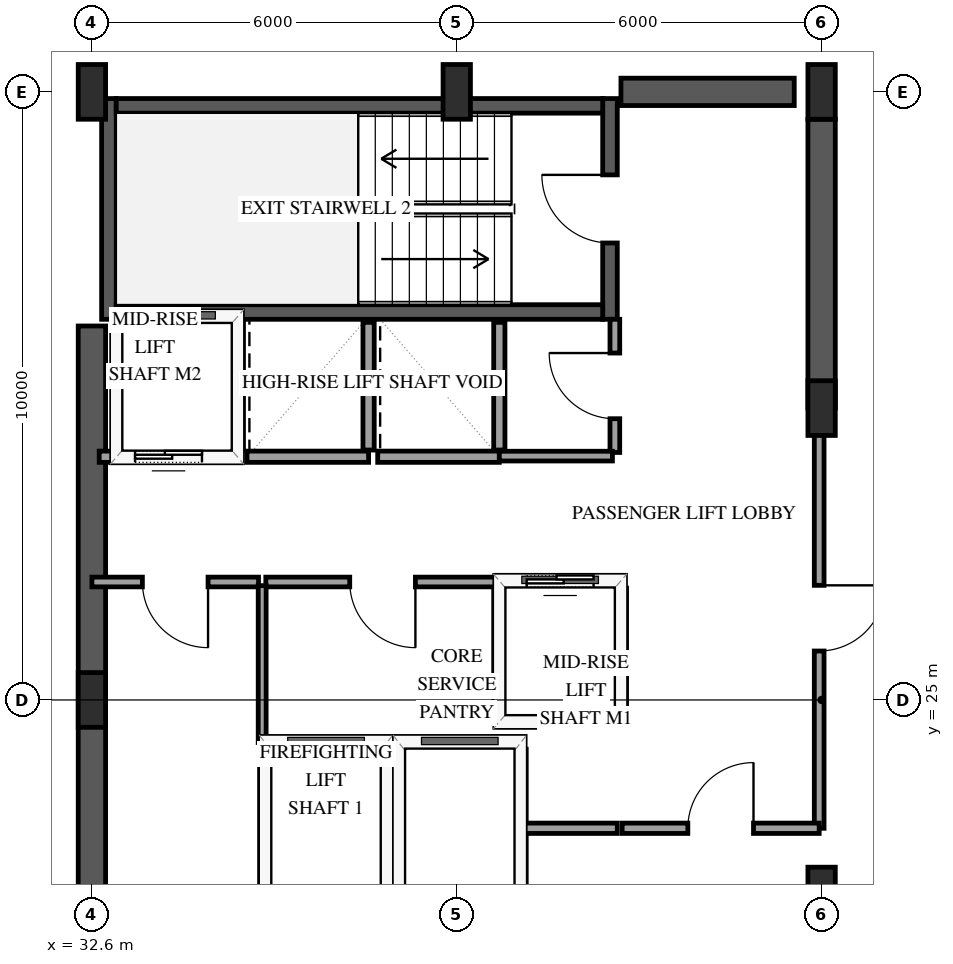
"""IFC4 building model, lengths in metres.
Left out: names, types, materials, properties, quantities, classifications, styles, units other than length and angle.
Written with IfcOpenShell. Run it as: python <this file> out.ifc"""

import sys

from ifc_helpers import new_model, si_unit, direction, frame, frame_2d, origin, origin_2d, place, context, subcontext, project, spatial, rectangle, extrude, element, fill, save


model = new_model("IFC4")
c1 = context("Model", 3, precision=1e-05, world=origin(), true_north=direction((0.0, 1.0)))
c2 = subcontext(c1, "Body", "Model", "MODEL_VIEW")
j1 = project(units=[si_unit("LENGTHUNIT", "METRE"), si_unit("PLANEANGLEUNIT", "RADIAN")], contexts=[c1])
p1 = place(None, origin())
s1 = spatial("IfcSite", under=j1, at=p1, CompositionType="ELEMENT")
p2 = place(p1, origin())
s2 = spatial("IfcBuilding", under=s1, at=p2, CompositionType="ELEMENT")
p3 = place(p2, frame((0.0, 0.0, 201.4)))
s3 = spatial("IfcBuildingStorey", under=s2, at=p3, CompositionType="ELEMENT", Elevation=201.4)
p4 = place(p3, frame((32.88, 31.26, 0.0), z_axis=(0.0, 0.0, 1.0), x_axis=(0.0, 1.0, 0.0)))
e1 = element("IfcWall", 1, at=p4, inside=s3, PredefinedType="SHEAR", context=c2, shape_type="SweptSolid", body=[
    extrude(rectangle(XDim=3.63, YDim=0.24, at=frame_2d((1.815, 0.0))), origin(), (0.0, 0.0, 1.0), 3.6),
])
p5 = place(p3, frame((41.12, 31.26, 0.0), z_axis=(0.0, 0.0, 1.0), x_axis=(0.0, 1.0, 0.0)))
e2 = element("IfcWall", 2, at=p5, inside=s3, PredefinedType="SHEAR", context=c2, shape_type="SweptSolid", body=[
    extrude(rectangle(XDim=3.63, YDim=0.24, at=frame_2d((1.815, 0.0))), origin(), (0.0, 0.0, 1.0), 3.6),
])
p6 = place(p5, frame((1.255, 0.0, 0.0)))
e3 = element("IfcOpeningElement", 3, at=p6, cuts=e2, PredefinedType="OPENING", context=c2, shape_type="SweptSolid", body=[
    extrude(rectangle(XDim=1.12, YDim=2.15, at=frame_2d((0.56, 1.075))), frame((0.0, 0.13, 0.0), z_axis=(0.0, -1.0, 0.0), x_axis=(1.0, 0.0, 0.0)), (0.0, 0.0, 1.0), 0.26),
])
for number, where, z_axis, x_axis in (
    (4, (33.0, 31.38, 0.0), (0.0, 0.0, 1.0), (1.0, 0.0, 0.0)),
    (5, (33.0, 34.77, 0.0), (0.0, 0.0, 1.0), (1.0, 0.0, 0.0)),
):
    element("IfcWall", number, at=place(p3, frame(where, z_axis=z_axis, x_axis=x_axis)), inside=s3, PredefinedType="SHEAR", context=c2, shape_type="SweptSolid", body=[
        extrude(rectangle(XDim=8.0, YDim=0.24, at=frame_2d((4.0, 0.0))), origin(), (0.0, 0.0, 1.0), 3.6),
    ])
p7 = place(p3, frame((32.6, 18.85, 0.0), z_axis=(0.0, 0.0, 1.0), x_axis=(0.0, 1.0, 0.0)))
e6 = element("IfcWall", 6, at=p7, inside=s3, PredefinedType="SHEAR", context=c2, shape_type="SweptSolid", body=[
    extrude(rectangle(XDim=12.3, YDim=0.45, at=frame_2d((6.15, 0.0))), origin(), (0.0, 0.0, 1.0), 3.6),
])
p8 = place(p3, frame((41.3, 35.0, 0.0), z_axis=(0.0, 0.0, 1.0), x_axis=(1.0, 0.0, 0.0)))
e7 = element("IfcWall", 7, at=p8, inside=s3, PredefinedType="SHEAR", context=c2, shape_type="SweptSolid", body=[
    extrude(rectangle(XDim=2.85, YDim=0.45, at=frame_2d((1.425, 0.0))), origin(), (0.0, 0.0, 1.0), 3.6),
])
p9 = place(p3, frame((44.6, 29.8, 0.0), z_axis=(0.0, 0.0, 1.0), x_axis=(0.0, 1.0, 0.0)))
e8 = element("IfcWall", 8, at=p9, inside=s3, PredefinedType="SHEAR", context=c2, shape_type="SweptSolid", body=[
    extrude(rectangle(XDim=4.75, YDim=0.45, at=frame_2d((2.375, 0.0))), origin(), (0.0, 0.0, 1.0), 3.6),
])
for number, where, z_axis, x_axis in (
    (9, (32.6, 25.0, 0.0), (0.0, 0.0, 1.0), (1.0, 0.0, 0.0)),
    (10, (32.6, 35.0, 0.0), (0.0, 0.0, 1.0), (1.0, 0.0, 0.0)),
    (11, (38.6, 35.0, 0.0), (0.0, 0.0, 1.0), (1.0, 0.0, 0.0)),
    (12, (44.6, 21.8, 0.0), (0.0, 0.0, 1.0), (1.0, 0.0, 0.0)),
    (13, (44.6, 29.8, 0.0), (0.0, 0.0, 1.0), (1.0, 0.0, 0.0)),
    (14, (44.6, 35.0, 0.0), (0.0, 0.0, 1.0), (1.0, 0.0, 0.0)),
):
    element("IfcColumn", number, at=place(p3, frame(where, z_axis=z_axis, x_axis=x_axis)), inside=s3, PredefinedType="PILASTER", context=c2, shape_type="SweptSolid", body=[
        extrude(rectangle(XDim=0.45, YDim=0.9, at=origin_2d()), origin(), (0.0, 0.0, 1.0), 3.6),
    ])
p10 = place(p3, frame((35.45, 24.3, 0.0), z_axis=(0.0, 0.0, 1.0), x_axis=(1.0, 0.0, 0.0)))
e15 = element("IfcWall", 15, at=p10, inside=s3, PredefinedType="SOLIDWALL", context=c2, shape_type="SweptSolid", body=[
    extrude(rectangle(XDim=2.0, YDim=0.185, at=frame_2d((1.0, 0.0))), origin(), (0.0, 0.0, 1.0), 3.3),
])
for number, where, z_axis, x_axis in (
    (16, (35.45, 21.81, 0.0), (0.0, 0.0, 1.0), (0.0, 1.0, 0.0)),
    (17, (37.45, 21.81, 0.0), (0.0, 0.0, 1.0), (0.0, 1.0, 0.0)),
):
    element("IfcWall", number, at=place(p3, frame(where, z_axis=z_axis, x_axis=x_axis)), inside=s3, PredefinedType="SOLIDWALL", context=c2, shape_type="SweptSolid", body=[
        extrude(rectangle(XDim=2.38, YDim=0.185, at=frame_2d((1.19, 0.0))), origin(), (0.0, 0.0, 1.0), 3.3),
    ])
p11 = place(p3, frame((37.65, 24.3, 0.0), z_axis=(0.0, 0.0, 1.0), x_axis=(1.0, 0.0, 0.0)))
e18 = element("IfcWall", 18, at=p11, inside=s3, PredefinedType="SOLIDWALL", context=c2, shape_type="SweptSolid", body=[
    extrude(rectangle(XDim=2.0, YDim=0.185, at=frame_2d((1.0, 0.0))), origin(), (0.0, 0.0, 1.0), 3.3),
])
p12 = place(p3, frame((39.65, 21.81, 0.0), z_axis=(0.0, 0.0, 1.0), x_axis=(0.0, 1.0, 0.0)))
e19 = element("IfcWall", 19, at=p12, inside=s3, PredefinedType="SOLIDWALL", context=c2, shape_type="SweptSolid", body=[
    extrude(rectangle(XDim=2.38, YDim=0.185, at=frame_2d((1.19, 0.0))), origin(), (0.0, 0.0, 1.0), 3.3),
])
p13 = place(p3, frame((39.3, 24.65, 0.0), z_axis=(0.0, 0.0, 1.0), x_axis=(1.0, 0.0, 0.0)))
e20 = element("IfcWall", 20, at=p13, inside=s3, PredefinedType="SOLIDWALL", context=c2, shape_type="SweptSolid", body=[
    extrude(rectangle(XDim=2.0, YDim=0.185, at=frame_2d((1.0, 0.0))), origin(), (0.0, 0.0, 1.0), 3.3),
])
p14 = place(p3, frame((39.3, 26.95, 0.0), z_axis=(0.0, 0.0, 1.0), x_axis=(1.0, 0.0, 0.0)))
e21 = element("IfcWall", 21, at=p14, inside=s3, PredefinedType="SOLIDWALL", context=c2, shape_type="SweptSolid", body=[
    extrude(rectangle(XDim=2.0, YDim=0.185, at=frame_2d((1.0, 0.0))), origin(), (0.0, 0.0, 1.0), 3.3),
])
p15 = place(p14, frame((0.45, 0.0, 0.0)))
e22 = element("IfcOpeningElement", 22, at=p15, cuts=e21, PredefinedType="OPENING", context=c2, shape_type="SweptSolid", body=[
    extrude(rectangle(XDim=1.1, YDim=2.15, at=frame_2d((0.55, 1.075))), frame((0.0, 0.103, 0.0), z_axis=(0.0, -1.0, 0.0), x_axis=(1.0, 0.0, 0.0)), (0.0, 0.0, 1.0), 0.205),
])
for number, where, z_axis, x_axis in (
    (23, (39.3, 24.76, 0.0), (0.0, 0.0, 1.0), (0.0, 1.0, 0.0)),
    (24, (41.3, 24.76, 0.0), (0.0, 0.0, 1.0), (0.0, 1.0, 0.0)),
):
    element("IfcWall", number, at=place(p3, frame(where, z_axis=z_axis, x_axis=x_axis)), inside=s3, PredefinedType="SOLIDWALL", context=c2, shape_type="SweptSolid", body=[
        extrude(rectangle(XDim=2.08, YDim=0.185, at=frame_2d((1.04, 0.0))), origin(), (0.0, 0.0, 1.0), 3.3),
    ])
p16 = place(p3, frame((32.72, 29.0, 0.0), z_axis=(0.0, 0.0, 1.0), x_axis=(1.0, 0.0, 0.0)))
e25 = element("IfcWall", 25, at=p16, inside=s3, PredefinedType="SOLIDWALL", context=c2, shape_type="SweptSolid", body=[
    extrude(rectangle(XDim=2.28, YDim=0.185, at=frame_2d((1.14, 0.0))), origin(), (0.0, 0.0, 1.0), 3.3),
])
p17 = place(p16, frame((0.59, 0.0, 0.0)))
e26 = element("IfcOpeningElement", 26, at=p17, cuts=e25, PredefinedType="OPENING", context=c2, shape_type="SweptSolid", body=[
    extrude(rectangle(XDim=1.1, YDim=2.15, at=frame_2d((0.55, 1.075))), frame((0.0, 0.103, 0.0), z_axis=(0.0, -1.0, 0.0), x_axis=(1.0, 0.0, 0.0)), (0.0, 0.0, 1.0), 0.205),
])
p18 = place(p3, frame((35.0, 29.11, 0.0), z_axis=(0.0, 0.0, 1.0), x_axis=(0.0, 1.0, 0.0)))
e27 = element("IfcWall", 27, at=p18, inside=s3, PredefinedType="SOLIDWALL", context=c2, shape_type="SweptSolid", body=[
    extrude(rectangle(XDim=2.1, YDim=0.185, at=frame_2d((1.05, 0.0))), origin(), (0.0, 0.0, 1.0), 3.3),
])
p19 = place(p3, frame((35.15, 29.0, 0.0), z_axis=(0.0, 0.0, 1.0), x_axis=(1.0, 0.0, 0.0)))
e28 = element("IfcWall", 28, at=p19, inside=s3, PredefinedType="SOLIDWALL", context=c2, shape_type="SweptSolid", body=[
    extrude(rectangle(XDim=2.0, YDim=0.185, at=frame_2d((1.0, 0.0))), origin(), (0.0, 0.0, 1.0), 3.3),
])
p20 = place(p3, frame((37.15, 29.11, 0.0), z_axis=(0.0, 0.0, 1.0), x_axis=(0.0, 1.0, 0.0)))
e29 = element("IfcWall", 29, at=p20, inside=s3, PredefinedType="SOLIDWALL", context=c2, shape_type="SweptSolid", body=[
    extrude(rectangle(XDim=2.1, YDim=0.185, at=frame_2d((1.05, 0.0))), origin(), (0.0, 0.0, 1.0), 3.3),
])
p21 = place(p3, frame((37.3, 29.0, 0.0), z_axis=(0.0, 0.0, 1.0), x_axis=(1.0, 0.0, 0.0)))
e30 = element("IfcWall", 30, at=p21, inside=s3, PredefinedType="SOLIDWALL", context=c2, shape_type="SweptSolid", body=[
    extrude(rectangle(XDim=2.0, YDim=0.185, at=frame_2d((1.0, 0.0))), origin(), (0.0, 0.0, 1.0), 3.3),
])
p22 = place(p3, frame((39.3, 29.11, 0.0), z_axis=(0.0, 0.0, 1.0), x_axis=(0.0, 1.0, 0.0)))
e31 = element("IfcWall", 31, at=p22, inside=s3, PredefinedType="SOLIDWALL", context=c2, shape_type="SweptSolid", body=[
    extrude(rectangle(XDim=2.1, YDim=0.185, at=frame_2d((1.05, 0.0))), origin(), (0.0, 0.0, 1.0), 3.3),
])
p23 = place(p3, frame((44.56, 29.8, 0.0), z_axis=(0.0, 0.0, 1.0), x_axis=(0.0, -1.0, 0.0)))
e32 = element("IfcWall", 32, at=p23, inside=s3, PredefinedType="PARTITIONING", context=c2, shape_type="SweptSolid", body=[
    extrude(rectangle(XDim=6.91, YDim=0.16, at=frame_2d((3.455, 0.0))), origin(), (0.0, 0.0, 1.0), 2.34),
])
p24 = place(p23, frame((2.915, 0.0, 0.0)))
e33 = element("IfcOpeningElement", 33, at=p24, cuts=e32, PredefinedType="OPENING", context=c2, shape_type="SweptSolid", body=[
    extrude(rectangle(XDim=1.08, YDim=2.15, at=frame_2d((0.54, 1.075))), frame((0.0, 0.09, 0.0), z_axis=(0.0, -1.0, 0.0), x_axis=(1.0, 0.0, 0.0)), (0.0, 0.0, 1.0), 0.18),
])
p25 = place(p3, frame((39.3, 26.94, 0.0), z_axis=(0.0, 0.0, 1.0), x_axis=(-1.0, 0.0, 0.0)))
e34 = element("IfcWall", 34, at=p25, inside=s3, PredefinedType="PARTITIONING", context=c2, shape_type="SweptSolid", body=[
    extrude(rectangle(XDim=3.84, YDim=0.16, at=frame_2d((1.92, 0.0))), origin(), (0.0, 0.0, 1.0), 3.3),
])
p26 = place(p25, frame((1.38, 0.0, 0.0)))
e35 = element("IfcOpeningElement", 35, at=p26, cuts=e34, PredefinedType="OPENING", context=c2, shape_type="SweptSolid", body=[
    extrude(rectangle(XDim=1.08, YDim=2.15, at=frame_2d((0.54, 1.075))), frame((0.0, 0.09, 0.0), z_axis=(0.0, -1.0, 0.0), x_axis=(1.0, 0.0, 0.0)), (0.0, 0.0, 1.0), 0.18),
])
p27 = place(p3, frame((41.32, 22.89, 0.0), z_axis=(0.0, 0.0, 1.0), x_axis=(1.0, 0.0, 0.0)))
e36 = element("IfcWall", 36, at=p27, inside=s3, PredefinedType="PARTITIONING", context=c2, shape_type="SweptSolid", body=[
    extrude(rectangle(XDim=3.24, YDim=0.17, at=frame_2d((1.62, 0.0))), origin(), (0.0, 0.0, 1.0), 3.3),
])
p28 = place(p27, frame((1.08, 0.0, 0.0)))
e37 = element("IfcOpeningElement", 37, at=p28, cuts=e36, PredefinedType="OPENING", context=c2, shape_type="SweptSolid", body=[
    extrude(rectangle(XDim=1.08, YDim=2.15, at=frame_2d((0.54, 1.075))), frame((0.0, 0.095, 0.0), z_axis=(0.0, -1.0, 0.0), x_axis=(1.0, 0.0, 0.0)), (0.0, 0.0, 1.0), 0.19),
])
p29 = place(p3, frame((35.34, 26.94, 0.0), z_axis=(0.0, 0.0, 1.0), x_axis=(-1.0, 0.0, 0.0)))
e38 = element("IfcWall", 38, at=p29, inside=s3, PredefinedType="PARTITIONING", context=c2, shape_type="SweptSolid", body=[
    extrude(rectangle(XDim=2.74, YDim=0.16, at=frame_2d((1.37, 0.0))), origin(), (0.0, 0.0, 1.0), 3.3),
])
p30 = place(p29, frame((0.83, 0.0, 0.0)))
e39 = element("IfcOpeningElement", 39, at=p30, cuts=e38, PredefinedType="OPENING", context=c2, shape_type="SweptSolid", body=[
    extrude(rectangle(XDim=1.08, YDim=2.15, at=frame_2d((0.54, 1.075))), frame((0.0, 0.09, 0.0), z_axis=(0.0, -1.0, 0.0), x_axis=(1.0, 0.0, 0.0)), (0.0, 0.0, 1.0), 0.18),
])
p31 = place(p3, frame((35.4, 26.88, 0.0), z_axis=(0.0, 0.0, 1.0), x_axis=(0.0, -1.0, 0.0)))
e40 = element("IfcWall", 40, at=p31, inside=s3, PredefinedType="PARTITIONING", context=c2, shape_type="SweptSolid", body=[
    extrude(rectangle(XDim=2.58, YDim=0.13, at=frame_2d((1.29, 0.0))), origin(), (0.0, 0.0, 1.0), 3.3),
])
p32 = place(p3, frame((41.2, 29.07, 0.0), z_axis=(0.0, 0.0, 1.0), x_axis=(0.0, 1.0, 0.0)))
e41 = element("IfcWall", 41, at=p32, inside=s3, PredefinedType="PARTITIONING", context=c2, shape_type="SweptSolid", body=[
    extrude(rectangle(XDim=2.19, YDim=0.16, at=frame_2d((1.095, 0.0))), origin(), (0.0, 0.0, 1.0), 3.3),
])
p33 = place(p32, frame((0.555, 0.0, 0.0)))
e42 = element("IfcOpeningElement", 42, at=p33, cuts=e41, PredefinedType="OPENING", context=c2, shape_type="SweptSolid", body=[
    extrude(rectangle(XDim=1.08, YDim=2.15, at=frame_2d((0.54, 1.075))), frame((0.0, 0.09, 0.0), z_axis=(0.0, -1.0, 0.0), x_axis=(1.0, 0.0, 0.0)), (0.0, 0.0, 1.0), 0.18),
])
p34 = place(p3, frame((39.3, 29.01, 0.0), z_axis=(0.0, 0.0, 1.0), x_axis=(1.0, 0.0, 0.0)))
e43 = element("IfcWall", 43, at=p34, inside=s3, PredefinedType="PARTITIONING", context=c2, shape_type="SweptSolid", body=[
    extrude(rectangle(XDim=1.86, YDim=0.16, at=frame_2d((0.93, 0.0))), origin(), (0.0, 0.0, 1.0), 3.3),
])
p35 = place(p3, frame((39.72, 22.89, 0.0), z_axis=(0.0, 0.0, 1.0), x_axis=(1.0, 0.0, 0.0)))
e44 = element("IfcWall", 44, at=p35, inside=s3, PredefinedType="PARTITIONING", context=c2, shape_type="SweptSolid", body=[
    extrude(rectangle(XDim=1.52, YDim=0.17, at=frame_2d((0.76, 0.0))), origin(), (0.0, 0.0, 1.0), 3.3),
])
p36 = place(p15, origin())
e45 = element("IfcDoor", 45, at=p36, inside=s3, OperationType="SLIDING_TO_LEFT", PredefinedType="DOOR", context=c2, shape_type="SweptSolid", body=[
    extrude(rectangle(XDim=1.1, YDim=2.15, at=frame_2d((0.55, 1.075))), frame((0.0, 0.025, 0.0), z_axis=(0.0, -1.0, 0.0), x_axis=(1.0, 0.0, 0.0)), (0.0, 0.0, 1.0), 0.05),
])
fill(e22, e45)
p37 = place(p17, origin())
e46 = element("IfcDoor", 46, at=p37, inside=s3, OperationType="SLIDING_TO_LEFT", PredefinedType="DOOR", context=c2, shape_type="SweptSolid", body=[
    extrude(rectangle(XDim=1.1, YDim=2.15, at=frame_2d((0.55, 1.075))), frame((0.0, 0.025, 0.0), z_axis=(0.0, -1.0, 0.0), x_axis=(1.0, 0.0, 0.0)), (0.0, 0.0, 1.0), 0.05),
])
fill(e26, e46)
p38 = place(p6, origin())
e47 = element("IfcDoor", 47, at=p38, inside=s3, OperationType="SINGLE_SWING_RIGHT", PredefinedType="DOOR", context=c2, shape_type="SweptSolid", body=[
    extrude(rectangle(XDim=1.12, YDim=2.15, at=frame_2d((0.56, 1.075))), frame((0.0, 0.025, 0.0), z_axis=(0.0, -1.0, 0.0), x_axis=(1.0, 0.0, 0.0)), (0.0, 0.0, 1.0), 0.05),
])
fill(e3, e47)
p39 = place(p24, origin())
e48 = element("IfcDoor", 48, at=p39, inside=s3, OperationType="SINGLE_SWING_LEFT", PredefinedType="DOOR", context=c2, shape_type="SweptSolid", body=[
    extrude(rectangle(XDim=1.08, YDim=2.15, at=frame_2d((0.54, 1.075))), frame((0.0, 0.025, 0.0), z_axis=(0.0, -1.0, 0.0), x_axis=(1.0, 0.0, 0.0)), (0.0, 0.0, 1.0), 0.05),
])
fill(e33, e48)
p40 = place(p26, origin())
e49 = element("IfcDoor", 49, at=p40, inside=s3, OperationType="SINGLE_SWING_LEFT", PredefinedType="DOOR", context=c2, shape_type="SweptSolid", body=[
    extrude(rectangle(XDim=1.08, YDim=2.15, at=frame_2d((0.54, 1.075))), frame((0.0, 0.025, 0.0), z_axis=(0.0, -1.0, 0.0), x_axis=(1.0, 0.0, 0.0)), (0.0, 0.0, 1.0), 0.05),
])
fill(e35, e49)
p41 = place(p28, origin())
e50 = element("IfcDoor", 50, at=p41, inside=s3, OperationType="SINGLE_SWING_RIGHT", PredefinedType="DOOR", context=c2, shape_type="SweptSolid", body=[
    extrude(rectangle(XDim=1.08, YDim=2.15, at=frame_2d((0.54, 1.075))), frame((0.0, 0.025, 0.0), z_axis=(0.0, -1.0, 0.0), x_axis=(1.0, 0.0, 0.0)), (0.0, 0.0, 1.0), 0.05),
])
fill(e37, e50)
p42 = place(p30, origin())
e51 = element("IfcDoor", 51, at=p42, inside=s3, OperationType="SINGLE_SWING_LEFT", PredefinedType="DOOR", context=c2, shape_type="SweptSolid", body=[
    extrude(rectangle(XDim=1.08, YDim=2.15, at=frame_2d((0.54, 1.075))), frame((0.0, 0.025, 0.0), z_axis=(0.0, -1.0, 0.0), x_axis=(1.0, 0.0, 0.0)), (0.0, 0.0, 1.0), 0.05),
])
fill(e39, e51)
p43 = place(p33, origin())
e52 = element("IfcDoor", 52, at=p43, inside=s3, OperationType="SINGLE_SWING_RIGHT", PredefinedType="DOOR", context=c2, shape_type="SweptSolid", body=[
    extrude(rectangle(XDim=1.08, YDim=2.15, at=frame_2d((0.54, 1.075))), frame((0.0, 0.025, 0.0), z_axis=(0.0, -1.0, 0.0), x_axis=(1.0, 0.0, 0.0)), (0.0, 0.0, 1.0), 0.05),
])
fill(e42, e52)
save(model, sys.argv[1])
